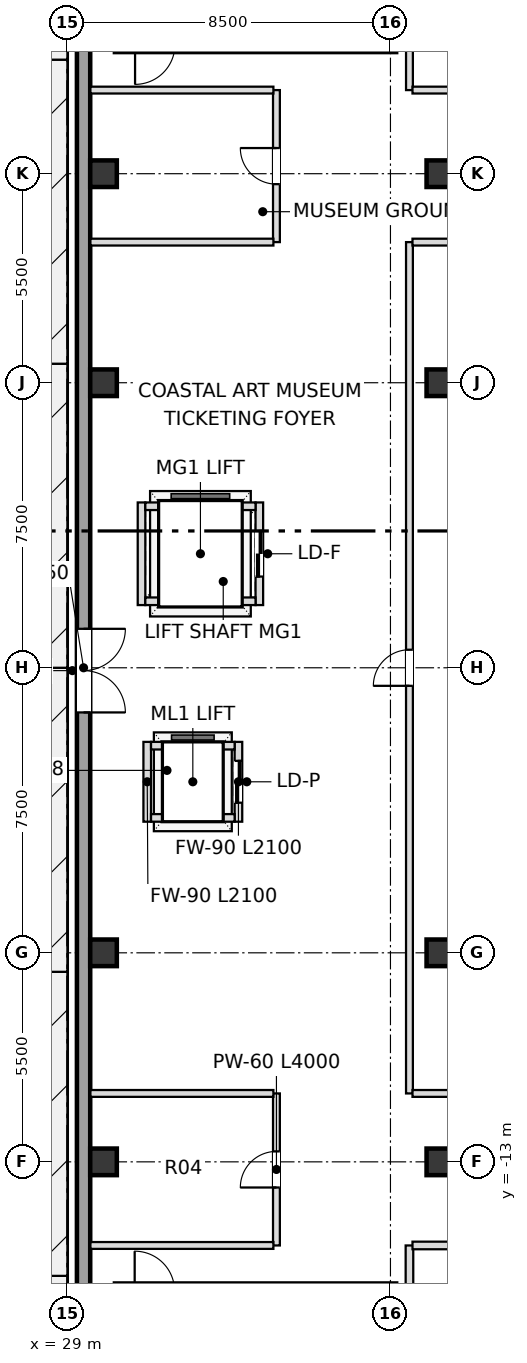
"""IFC4 building model, lengths in metres.
Left out: names, types, materials, properties, quantities, classifications, styles, units other than length and angle.
Written with IfcOpenShell. Run it as: python <this file> out.ifc"""

import sys

from ifc_helpers import new_model, si_unit, direction, frame, frame_2d, origin, origin_2d, place, context, subcontext, project, spatial, rectangle, extrude, element, fill, save


model = new_model("IFC4")
c1 = context("Model", 3, precision=1e-05, world=origin(), true_north=direction((0.0, 1.0)))
c2 = subcontext(c1, "Body", "Model", "MODEL_VIEW")
j1 = project(units=[si_unit("LENGTHUNIT", "METRE"), si_unit("PLANEANGLEUNIT", "RADIAN")], contexts=[c1])
p1 = place(None, origin())
s1 = spatial("IfcSite", under=j1, at=p1, CompositionType="ELEMENT")
p2 = place(p1, origin())
s2 = spatial("IfcBuilding", under=s1, at=p2, CompositionType="ELEMENT")
p3 = place(p2, origin())
s3 = spatial("IfcBuildingStorey", under=s2, at=p3, CompositionType="ELEMENT", Elevation=0.0)
for number, where, z_axis, x_axis in (
    (1, (29.95, -13.0, 0.0), (0.0, 0.0, 1.0), (1.0, 0.0, 0.0)),
    (2, (29.95, -7.5, 0.0), (0.0, 0.0, 1.0), (1.0, 0.0, 0.0)),
    (3, (29.95, 7.5, 0.0), (0.0, 0.0, 1.0), (1.0, 0.0, 0.0)),
    (4, (29.95, 13.0, 0.0), (0.0, 0.0, 1.0), (1.0, 0.0, 0.0)),
    (5, (38.8, -13.0, 0.0), (0.0, 0.0, 1.0), (1.0, 0.0, 0.0)),
    (6, (38.8, -7.5, 0.0), (0.0, 0.0, 1.0), (1.0, 0.0, 0.0)),
    (7, (38.8, 7.5, 0.0), (0.0, 0.0, 1.0), (1.0, 0.0, 0.0)),
    (8, (38.8, 13.0, 0.0), (0.0, 0.0, 1.0), (1.0, 0.0, 0.0)),
):
    element("IfcColumn", number, at=place(p3, frame(where, z_axis=z_axis, x_axis=x_axis)), inside=s3, PredefinedType="COLUMN", context=c2, shape_type="SweptSolid", body=[
        extrude(rectangle(XDim=0.7, YDim=0.7, at=origin_2d()), origin(), (0.0, 0.0, 1.0), 6.0),
    ])
p4 = place(p3, frame((29.425, 23.825, 0.0), z_axis=(0.0, 0.0, 1.0), x_axis=(0.0, -1.0, 0.0)))
e9 = element("IfcWall", 9, at=p4, inside=s3, PredefinedType="SOLIDWALL", context=c2, shape_type="SweptSolid", body=[
    extrude(rectangle(XDim=47.65, YDim=0.35, at=frame_2d((23.825, 0.0))), origin(), (0.0, 0.0, 1.0), 5.68),
])
p5 = place(p4, frame((22.8, 0.0, 0.0)))
e10 = element("IfcOpeningElement", 10, at=p5, cuts=e9, PredefinedType="OPENING", context=c2, shape_type="SweptSolid", body=[
    extrude(rectangle(XDim=2.2, YDim=2.5, at=frame_2d((1.1, 1.25))), frame((0.0, 0.185, 0.0), z_axis=(0.0, -1.0, 0.0), x_axis=(1.0, 0.0, 0.0)), (0.0, 0.0, 1.0), 0.37),
])
p6 = place(p3, frame((33.5, -4.05, 0.0), z_axis=(0.0, 0.0, 1.0), x_axis=(0.0, 1.0, 0.0)))
e11 = element("IfcWall", 11, at=p6, inside=s3, PredefinedType="SOLIDWALL", context=c2, shape_type="SweptSolid", body=[
    extrude(rectangle(XDim=2.1, YDim=0.2, at=frame_2d((1.05, 0.0))), origin(), (0.0, 0.0, 1.0), 4.897),
])
p7 = place(p6, frame((0.5, 0.0, 0.0)))
e12 = element("IfcOpeningElement", 12, at=p7, cuts=e11, PredefinedType="OPENING", context=c2, shape_type="SweptSolid", body=[
    extrude(rectangle(XDim=1.1, YDim=2.15, at=frame_2d((0.55, 1.075))), frame((0.0, 0.11, 0.0), z_axis=(0.0, -1.0, 0.0), x_axis=(1.0, 0.0, 0.0)), (0.0, 0.0, 1.0), 0.22),
])
p8 = place(p3, frame((31.1, -4.05, 0.0), z_axis=(0.0, 0.0, 1.0), x_axis=(0.0, 1.0, 0.0)))
e13 = element("IfcWall", 13, at=p8, inside=s3, PredefinedType="SOLIDWALL", context=c2, shape_type="SweptSolid", body=[
    extrude(rectangle(XDim=2.1, YDim=0.2, at=frame_2d((1.05, 0.0))), origin(), (0.0, 0.0, 1.0), 4.897),
])
for number, where, z_axis, x_axis in (
    (14, (31.2, -3.95, 0.0), (0.0, 0.0, 1.0), (1.0, 0.0, 0.0)),
    (15, (31.2, -2.05, 0.0), (0.0, 0.0, 1.0), (1.0, 0.0, 0.0)),
):
    element("IfcWall", number, at=place(p3, frame(where, z_axis=z_axis, x_axis=x_axis)), inside=s3, PredefinedType="SOLIDWALL", context=c2, shape_type="SweptSolid", body=[
        extrude(rectangle(XDim=2.2, YDim=0.2, at=frame_2d((1.1, 0.0))), origin(), (0.0, 0.0, 1.0), 4.897),
    ])
p9 = place(p3, frame((34.05, 1.65, 0.0), z_axis=(0.0, 0.0, 1.0), x_axis=(0.0, 1.0, 0.0)))
e16 = element("IfcWall", 16, at=p9, inside=s3, PredefinedType="SOLIDWALL", context=c2, shape_type="SweptSolid", body=[
    extrude(rectangle(XDim=2.7, YDim=0.2, at=frame_2d((1.35, 0.0))), origin(), (0.0, 0.0, 1.0), 4.897),
])
p10 = place(p9, frame((0.75, 0.0, 0.0)))
e17 = element("IfcOpeningElement", 17, at=p10, cuts=e16, PredefinedType="OPENING", context=c2, shape_type="SweptSolid", body=[
    extrude(rectangle(XDim=1.2, YDim=2.2, at=frame_2d((0.6, 1.1))), frame((0.0, 0.11, 0.0), z_axis=(0.0, -1.0, 0.0), x_axis=(1.0, 0.0, 0.0)), (0.0, 0.0, 1.0), 0.22),
])
p11 = place(p3, frame((30.95, 1.65, 0.0), z_axis=(0.0, 0.0, 1.0), x_axis=(0.0, 1.0, 0.0)))
e18 = element("IfcWall", 18, at=p11, inside=s3, PredefinedType="SOLIDWALL", context=c2, shape_type="SweptSolid", body=[
    extrude(rectangle(XDim=2.7, YDim=0.2, at=frame_2d((1.35, 0.0))), origin(), (0.0, 0.0, 1.0), 4.897),
])
for number, where, z_axis, x_axis in (
    (19, (31.05, 1.75, 0.0), (0.0, 0.0, 1.0), (1.0, 0.0, 0.0)),
    (20, (31.05, 4.25, 0.0), (0.0, 0.0, 1.0), (1.0, 0.0, 0.0)),
):
    element("IfcWall", number, at=place(p3, frame(where, z_axis=z_axis, x_axis=x_axis)), inside=s3, PredefinedType="SOLIDWALL", context=c2, shape_type="SweptSolid", body=[
        extrude(rectangle(XDim=2.9, YDim=0.2, at=frame_2d((1.45, 0.0))), origin(), (0.0, 0.0, 1.0), 4.897),
    ])
p12 = place(p3, frame((34.5, -15.2, 0.0), z_axis=(0.0, 0.0, 1.0), x_axis=(0.0, 1.0, 0.0)))
e21 = element("IfcWall", 21, at=p12, inside=s3, PredefinedType="PARTITIONING", context=c2, shape_type="SweptSolid", body=[
    extrude(rectangle(XDim=4.0, YDim=0.18, at=frame_2d((2.0, 0.0))), origin(), (0.0, 0.0, 1.0), 4.897),
])
p13 = place(p12, frame((1.525, 0.0, 0.0)))
e22 = element("IfcOpeningElement", 22, at=p13, cuts=e21, PredefinedType="OPENING", context=c2, shape_type="SweptSolid", body=[
    extrude(rectangle(XDim=0.95, YDim=2.15, at=frame_2d((0.475, 1.075))), frame((0.0, 0.1, 0.0), z_axis=(0.0, -1.0, 0.0), x_axis=(1.0, 0.0, 0.0)), (0.0, 0.0, 1.0), 0.2),
])
p14 = place(p3, frame((34.5, 11.2, 0.0), z_axis=(0.0, 0.0, 1.0), x_axis=(0.0, 1.0, 0.0)))
e23 = element("IfcWall", 23, at=p14, inside=s3, PredefinedType="PARTITIONING", context=c2, shape_type="SweptSolid", body=[
    extrude(rectangle(XDim=4.0, YDim=0.18, at=frame_2d((2.0, 0.0))), origin(), (0.0, 0.0, 1.0), 4.897),
])
p15 = place(p14, frame((1.525, 0.0, 0.0)))
e24 = element("IfcOpeningElement", 24, at=p15, cuts=e23, PredefinedType="OPENING", context=c2, shape_type="SweptSolid", body=[
    extrude(rectangle(XDim=0.95, YDim=2.15, at=frame_2d((0.475, 1.075))), frame((0.0, 0.1, 0.0), z_axis=(0.0, -1.0, 0.0), x_axis=(1.0, 0.0, 0.0)), (0.0, 0.0, 1.0), 0.2),
])
p16 = place(p3, frame((38.0, -19.74, 0.0), z_axis=(0.0, 0.0, 1.0), x_axis=(0.0, 1.0, 0.0)))
e25 = element("IfcWall", 25, at=p16, inside=s3, PredefinedType="SOLIDWALL", context=c2, shape_type="SweptSolid", body=[
    extrude(rectangle(XDim=4.54, YDim=0.2, at=frame_2d((2.27, 0.0))), origin(), (0.0, 0.0, 1.0), 5.68),
])
p17 = place(p3, frame((38.0, -11.2, 0.0), z_axis=(0.0, 0.0, 1.0), x_axis=(0.0, 1.0, 0.0)))
e26 = element("IfcWall", 26, at=p17, inside=s3, PredefinedType="PARTITIONING", context=c2, shape_type="SweptSolid", body=[
    extrude(rectangle(XDim=22.4, YDim=0.18, at=frame_2d((11.2, 0.0))), origin(), (0.0, 0.0, 1.0), 4.897),
])
p18 = place(p17, frame((10.725, 0.0, 0.0)))
e27 = element("IfcOpeningElement", 27, at=p18, cuts=e26, PredefinedType="OPENING", context=c2, shape_type="SweptSolid", body=[
    extrude(rectangle(XDim=0.95, YDim=2.15, at=frame_2d((0.475, 1.075))), frame((0.0, 0.1, 0.0), z_axis=(0.0, -1.0, 0.0), x_axis=(1.0, 0.0, 0.0)), (0.0, 0.0, 1.0), 0.2),
])
p19 = place(p3, frame((38.0, 15.2, 0.0), z_axis=(0.0, 0.0, 1.0), x_axis=(0.0, 1.0, 0.0)))
e28 = element("IfcWall", 28, at=p19, inside=s3, PredefinedType="PARTITIONING", context=c2, shape_type="SweptSolid", body=[
    extrude(rectangle(XDim=4.54, YDim=0.18, at=frame_2d((2.27, 0.0))), origin(), (0.0, 0.0, 1.0), 5.68),
])
p20 = place(p3, frame((29.605, -15.2, 0.0), z_axis=(0.0, 0.0, 1.0), x_axis=(1.0, 0.0, 0.0)))
e29 = element("IfcWall", 29, at=p20, inside=s3, PredefinedType="PARTITIONING", context=c2, shape_type="SweptSolid", body=[
    extrude(rectangle(XDim=4.815, YDim=0.18, at=frame_2d((2.407, 0.0))), origin(), (0.0, 0.0, 1.0), 4.814),
])
p21 = place(p3, frame((38.08, -15.2, 0.0), z_axis=(0.0, 0.0, 1.0), x_axis=(1.0, 0.0, 0.0)))
e30 = element("IfcWall", 30, at=p21, inside=s3, PredefinedType="SOLIDWALL", context=c2, shape_type="SweptSolid", body=[
    extrude(rectangle(XDim=19.065, YDim=0.2, at=frame_2d((9.532, 0.0))), origin(), (0.0, 0.0, 1.0), 4.814),
])
p22 = place(p21, frame((5.895, 0.0, 0.0)))
e31 = element("IfcOpeningElement", 31, at=p22, cuts=e30, PredefinedType="OPENING", context=c2, shape_type="SweptSolid", body=[
    extrude(rectangle(XDim=1.05, YDim=2.15, at=frame_2d((0.525, 1.075))), frame((0.0, 0.11, 0.0), z_axis=(0.0, -1.0, 0.0), x_axis=(1.0, 0.0, 0.0)), (0.0, 0.0, 1.0), 0.22),
])
p23 = place(p3, frame((29.605, -11.2, 0.0), z_axis=(0.0, 0.0, 1.0), x_axis=(1.0, 0.0, 0.0)))
e32 = element("IfcWall", 32, at=p23, inside=s3, PredefinedType="PARTITIONING", context=c2, shape_type="SweptSolid", body=[
    extrude(rectangle(XDim=4.815, YDim=0.18, at=frame_2d((2.407, 0.0))), origin(), (0.0, 0.0, 1.0), 4.897),
])
p24 = place(p3, frame((38.08, -11.2, 0.0), z_axis=(0.0, 0.0, 1.0), x_axis=(1.0, 0.0, 0.0)))
e33 = element("IfcWall", 33, at=p24, inside=s3, PredefinedType="PARTITIONING", context=c2, shape_type="SweptSolid", body=[
    extrude(rectangle(XDim=19.065, YDim=0.18, at=frame_2d((9.532, 0.0))), origin(), (0.0, 0.0, 1.0), 4.897),
])
p25 = place(p3, frame((29.605, 11.2, 0.0), z_axis=(0.0, 0.0, 1.0), x_axis=(1.0, 0.0, 0.0)))
e34 = element("IfcWall", 34, at=p25, inside=s3, PredefinedType="PARTITIONING", context=c2, shape_type="SweptSolid", body=[
    extrude(rectangle(XDim=4.815, YDim=0.18, at=frame_2d((2.407, 0.0))), origin(), (0.0, 0.0, 1.0), 4.897),
])
p26 = place(p3, frame((38.08, 11.2, 0.0), z_axis=(0.0, 0.0, 1.0), x_axis=(1.0, 0.0, 0.0)))
e35 = element("IfcWall", 35, at=p26, inside=s3, PredefinedType="PARTITIONING", context=c2, shape_type="SweptSolid", body=[
    extrude(rectangle(XDim=19.065, YDim=0.18, at=frame_2d((9.532, 0.0))), origin(), (0.0, 0.0, 1.0), 4.897),
])
p27 = place(p3, frame((29.605, 15.2, 0.0), z_axis=(0.0, 0.0, 1.0), x_axis=(1.0, 0.0, 0.0)))
e36 = element("IfcWall", 36, at=p27, inside=s3, PredefinedType="PARTITIONING", context=c2, shape_type="SweptSolid", body=[
    extrude(rectangle(XDim=4.815, YDim=0.18, at=frame_2d((2.407, 0.0))), origin(), (0.0, 0.0, 1.0), 4.897),
])
p28 = place(p3, frame((38.08, 15.2, 0.0), z_axis=(0.0, 0.0, 1.0), x_axis=(1.0, 0.0, 0.0)))
e37 = element("IfcWall", 37, at=p28, inside=s3, PredefinedType="PARTITIONING", context=c2, shape_type="SweptSolid", body=[
    extrude(rectangle(XDim=19.065, YDim=0.18, at=frame_2d((9.532, 0.0))), origin(), (0.0, 0.0, 1.0), 4.897),
])
p29 = place(p28, frame((5.945, 0.0, 0.0)))
e38 = element("IfcOpeningElement", 38, at=p29, cuts=e37, PredefinedType="OPENING", context=c2, shape_type="SweptSolid", body=[
    extrude(rectangle(XDim=0.95, YDim=2.15, at=frame_2d((0.475, 1.075))), frame((0.0, 0.1, 0.0), z_axis=(0.0, -1.0, 0.0), x_axis=(1.0, 0.0, 0.0)), (0.0, 0.0, 1.0), 0.2),
])
p30 = place(p5, origin())
e39 = element("IfcDoor", 39, at=p30, inside=s3, OperationType="DOUBLE_DOOR_SINGLE_SWING", PredefinedType="DOOR", context=c2, shape_type="SweptSolid", body=[
    extrude(rectangle(XDim=2.2, YDim=2.5, at=frame_2d((1.1, 1.25))), frame((0.0, 0.025, 0.0), z_axis=(0.0, -1.0, 0.0), x_axis=(1.0, 0.0, 0.0)), (0.0, 0.0, 1.0), 0.05),
])
fill(e10, e39)
p31 = place(p7, origin())
e40 = element("IfcDoor", 40, at=p31, inside=s3, OperationType="DOUBLE_DOOR_SLIDING", PredefinedType="DOOR", context=c2, shape_type="SweptSolid", body=[
    extrude(rectangle(XDim=1.1, YDim=2.15, at=frame_2d((0.55, 1.075))), frame((0.0, 0.025, 0.0), z_axis=(0.0, -1.0, 0.0), x_axis=(1.0, 0.0, 0.0)), (0.0, 0.0, 1.0), 0.05),
])
fill(e12, e40)
p32 = place(p10, origin())
e41 = element("IfcDoor", 41, at=p32, inside=s3, OperationType="DOUBLE_DOOR_SLIDING", PredefinedType="DOOR", context=c2, shape_type="SweptSolid", body=[
    extrude(rectangle(XDim=1.2, YDim=2.2, at=frame_2d((0.6, 1.1))), frame((0.0, 0.025, 0.0), z_axis=(0.0, -1.0, 0.0), x_axis=(1.0, 0.0, 0.0)), (0.0, 0.0, 1.0), 0.05),
])
fill(e17, e41)
p33 = place(p18, origin())
e42 = element("IfcDoor", 42, at=p33, inside=s3, OperationType="SINGLE_SWING_LEFT", PredefinedType="DOOR", context=c2, shape_type="SweptSolid", body=[
    extrude(rectangle(XDim=0.95, YDim=2.15, at=frame_2d((0.475, 1.075))), frame((0.0, 0.025, 0.0), z_axis=(0.0, -1.0, 0.0), x_axis=(1.0, 0.0, 0.0)), (0.0, 0.0, 1.0), 0.05),
])
fill(e27, e42)
p34 = place(p15, origin())
e43 = element("IfcDoor", 43, at=p34, inside=s3, OperationType="SINGLE_SWING_RIGHT", PredefinedType="DOOR", context=c2, shape_type="SweptSolid", body=[
    extrude(rectangle(XDim=0.95, YDim=2.15, at=frame_2d((0.475, 1.075))), frame((0.0, 0.025, 0.0), z_axis=(0.0, -1.0, 0.0), x_axis=(1.0, 0.0, 0.0)), (0.0, 0.0, 1.0), 0.05),
])
fill(e24, e43)
p35 = place(p13, origin())
e44 = element("IfcDoor", 44, at=p35, inside=s3, OperationType="SINGLE_SWING_LEFT", PredefinedType="DOOR", context=c2, shape_type="SweptSolid", body=[
    extrude(rectangle(XDim=0.95, YDim=2.15, at=frame_2d((0.475, 1.075))), frame((0.0, 0.025, 0.0), z_axis=(0.0, -1.0, 0.0), x_axis=(1.0, 0.0, 0.0)), (0.0, 0.0, 1.0), 0.05),
])
fill(e22, e44)
save(model, sys.argv[1])
